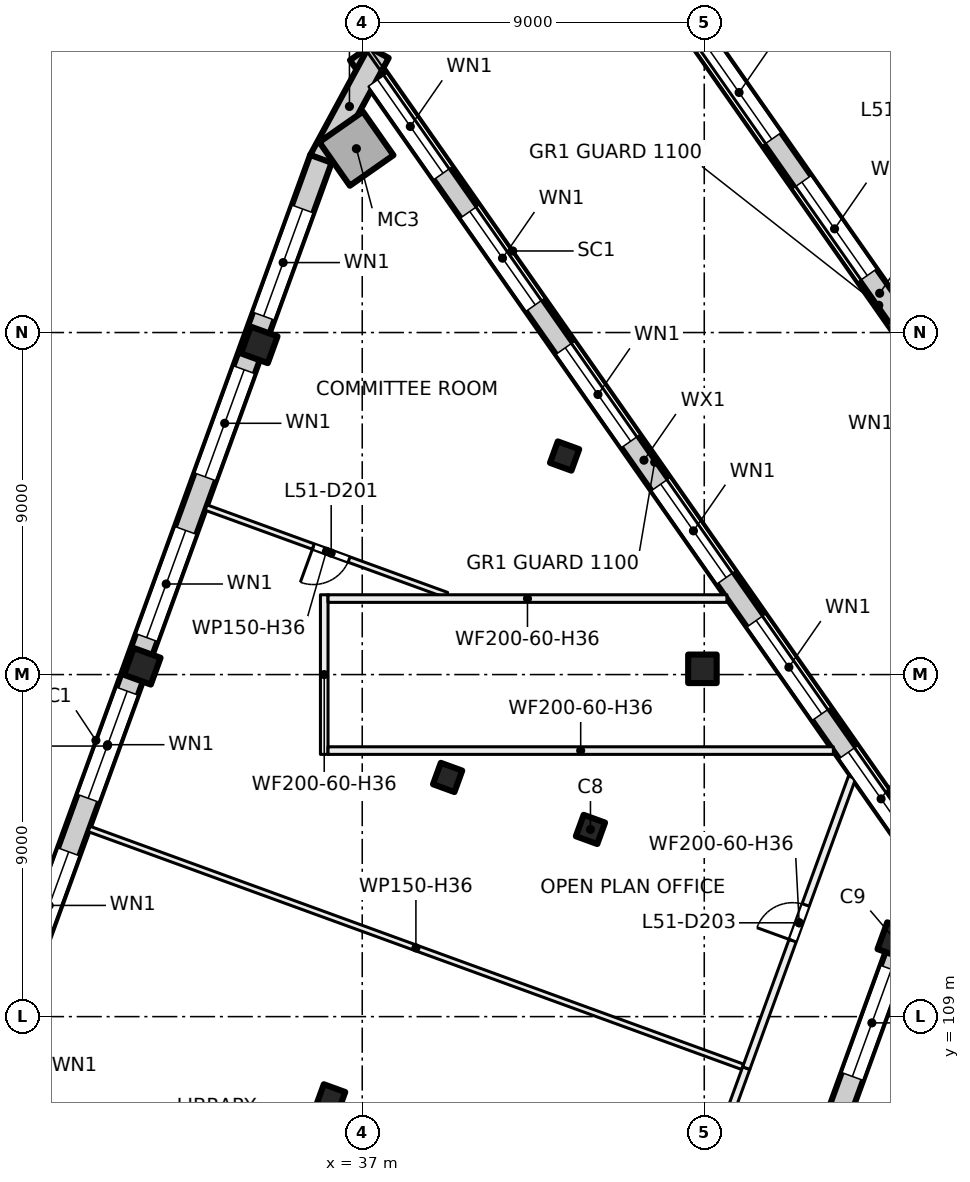
"""IFC4 building model, lengths in metres.
Left out: names, types, materials, properties, quantities, classifications, styles, units other than length and angle.
Written with IfcOpenShell. Run it as: python <this file> out.ifc"""

import sys

from ifc_helpers import new_model, si_unit, direction, frame, frame_2d, origin, origin_2d, place, context, subcontext, project, spatial, rectangle, hollow_rectangle, extrude, element, fill, save


model = new_model("IFC4")
c1 = context("Model", 3, precision=1e-05, world=origin(), true_north=direction((0.0, 1.0)))
c2 = subcontext(c1, "Body", "Model", "MODEL_VIEW")
j1 = project(units=[si_unit("LENGTHUNIT", "METRE"), si_unit("PLANEANGLEUNIT", "RADIAN")], contexts=[c1])
p1 = place(None, origin())
s1 = spatial("IfcSite", under=j1, at=p1, CompositionType="ELEMENT")
p2 = place(p1, origin())
s2 = spatial("IfcBuilding", under=s1, at=p2, CompositionType="ELEMENT")
p3 = place(p2, frame((0.0, 0.0, 216.0)))
s3 = spatial("IfcBuildingStorey", under=s2, at=p3, CompositionType="ELEMENT", Elevation=216.0)
p4 = place(p3, frame((36.846, 131.838, 0.0), z_axis=(0.0, 0.0, 1.0), x_axis=(0.573576436351, -0.819152044289, 0.0)))
e1 = element("IfcColumn", 1, at=p4, inside=s3, PredefinedType="COLUMN", context=c2, shape_type="SweptSolid", body=[
    extrude(hollow_rectangle(XDim=1.4, YDim=1.4, WallThickness=0.032, at=origin_2d()), origin(), (0.0, 0.0, 1.0), 4.0),
])
p5 = place(p3, frame((45.952, 118.152, 0.0), z_axis=(0.0, 0.0, 1.0), x_axis=(1.0, 0.0, 0.0)))
e2 = element("IfcColumn", 2, at=p5, inside=s3, PredefinedType="COLUMN", context=c2, shape_type="SweptSolid", body=[
    extrude(rectangle(XDim=0.75, YDim=0.75, at=origin_2d()), origin(), (0.0, 0.0, 1.0), 4.0),
])
for number, where, z_axis, x_axis in (
    (3, (43.006, 113.925, 0.0), (0.0, 0.0, 1.0), (-0.342, -0.94, 0.0)),
    (4, (42.325, 123.751, 0.0), (0.0, 0.0, 1.0), (-0.342, -0.94, 0.0)),
    (5, (39.247, 115.293, 0.0), (0.0, 0.0, 1.0), (-0.342, -0.94, 0.0)),
    (6, (36.169, 106.836, 0.0), (0.0, 0.0, 1.0), (-0.342, -0.94, 0.0)),
):
    element("IfcColumn", number, at=place(p3, frame(where, z_axis=z_axis, x_axis=x_axis)), inside=s3, PredefinedType="COLUMN", context=c2, shape_type="SweptSolid", body=[
        extrude(rectangle(XDim=0.6, YDim=0.6, at=origin_2d()), origin(), (0.0, 0.0, 1.0), 4.0),
    ])
for number, where, z_axis, x_axis in (
    (7, (51.04, 111.001, 0.0), (0.0, 0.0, 1.0), (-0.342, -0.94, 0.0)),
    (8, (34.291, 126.675, 0.0), (0.0, 0.0, 1.0), (-0.342, -0.94, 0.0)),
    (9, (31.212, 118.218, 0.0), (0.0, 0.0, 1.0), (-0.342, -0.94, 0.0)),
):
    element("IfcColumn", number, at=place(p3, frame(where, z_axis=z_axis, x_axis=x_axis)), inside=s3, PredefinedType="COLUMN", context=c2, shape_type="SweptSolid", body=[
        extrude(rectangle(XDim=0.75, YDim=0.75, at=origin_2d()), origin(), (0.0, 0.0, 1.0), 4.0),
    ])
p6 = place(p3, frame((58.083, 117.369, 0.0), z_axis=(0.0, 0.0, 1.0), x_axis=(-0.573573095716, 0.819154383416, 0.0)))
e10 = element("IfcWall", 10, at=p6, inside=s3, PredefinedType="SOLIDWALL", context=c2, shape_type="SweptSolid", body=[
    extrude(rectangle(XDim=26.037, YDim=0.6, at=frame_2d((13.019, 0.0))), origin(), (0.0, 0.0, 1.0), 3.625),
])
p7 = place(p6, frame((0.6, 0.0, 0.9)))
e11 = element("IfcOpeningElement", 11, at=p7, cuts=e10, PredefinedType="OPENING", context=c2, shape_type="SweptSolid", body=[
    extrude(rectangle(XDim=3.0, YDim=2.4, at=frame_2d((1.5, 1.2))), frame((0.0, 0.31, 0.0), z_axis=(0.0, -1.0, 0.0), x_axis=(1.0, 0.0, 0.0)), (0.0, 0.0, 1.0), 0.62),
])
p8 = place(p6, frame((4.829, 0.0, 0.9)))
e12 = element("IfcOpeningElement", 12, at=p8, cuts=e10, PredefinedType="OPENING", context=c2, shape_type="SweptSolid", body=[
    extrude(rectangle(XDim=3.0, YDim=2.4, at=frame_2d((1.5, 1.2))), frame((0.0, 0.31, 0.0), z_axis=(0.0, -1.0, 0.0), x_axis=(1.0, 0.0, 0.0)), (0.0, 0.0, 1.0), 0.62),
])
p9 = place(p6, frame((9.209, 0.0, 0.9)))
e13 = element("IfcOpeningElement", 13, at=p9, cuts=e10, PredefinedType="OPENING", context=c2, shape_type="SweptSolid", body=[
    extrude(rectangle(XDim=3.0, YDim=2.4, at=frame_2d((1.5, 1.2))), frame((0.0, 0.31, 0.0), z_axis=(0.0, -1.0, 0.0), x_axis=(1.0, 0.0, 0.0)), (0.0, 0.0, 1.0), 0.62),
])
p10 = place(p6, frame((13.588, 0.0, 0.9)))
e14 = element("IfcOpeningElement", 14, at=p10, cuts=e10, PredefinedType="OPENING", context=c2, shape_type="SweptSolid", body=[
    extrude(rectangle(XDim=3.0, YDim=2.4, at=frame_2d((1.5, 1.2))), frame((0.0, 0.31, 0.0), z_axis=(0.0, -1.0, 0.0), x_axis=(1.0, 0.0, 0.0)), (0.0, 0.0, 1.0), 0.62),
])
p11 = place(p6, frame((17.968, 0.0, 0.9)))
e15 = element("IfcOpeningElement", 15, at=p11, cuts=e10, PredefinedType="OPENING", context=c2, shape_type="SweptSolid", body=[
    extrude(rectangle(XDim=3.0, YDim=2.4, at=frame_2d((1.5, 1.2))), frame((0.0, 0.31, 0.0), z_axis=(0.0, -1.0, 0.0), x_axis=(1.0, 0.0, 0.0)), (0.0, 0.0, 1.0), 0.62),
])
p12 = place(p6, frame((22.198, 0.0, 0.9)))
e16 = element("IfcOpeningElement", 16, at=p12, cuts=e10, PredefinedType="OPENING", context=c2, shape_type="SweptSolid", body=[
    extrude(rectangle(XDim=3.0, YDim=2.4, at=frame_2d((1.5, 1.2))), frame((0.0, 0.31, 0.0), z_axis=(0.0, -1.0, 0.0), x_axis=(1.0, 0.0, 0.0)), (0.0, 0.0, 1.0), 0.62),
])
p13 = place(p3, frame((51.877, 112.862, 0.0), z_axis=(0.0, 0.0, 1.0), x_axis=(-0.342020589714, -0.939692458314, 0.0)))
e17 = element("IfcWall", 17, at=p13, inside=s3, PredefinedType="SOLIDWALL", context=c2, shape_type="SweptSolid", body=[
    extrude(rectangle(XDim=20.765, YDim=0.6, at=frame_2d((10.382, 0.0))), origin(), (0.0, 0.0, 1.0), 3.625),
])
p14 = place(p13, frame((2.785, 0.0, 0.9)))
e18 = element("IfcOpeningElement", 18, at=p14, cuts=e17, PredefinedType="OPENING", context=c2, shape_type="SweptSolid", body=[
    extrude(rectangle(XDim=3.0, YDim=2.4, at=frame_2d((1.5, 1.2))), frame((0.0, 0.31, 0.0), z_axis=(0.0, -1.0, 0.0), x_axis=(1.0, 0.0, 0.0)), (0.0, 0.0, 1.0), 0.62),
])
p15 = place(p13, frame((7.285, 0.0, 0.9)))
e19 = element("IfcOpeningElement", 19, at=p15, cuts=e17, PredefinedType="OPENING", context=c2, shape_type="SweptSolid", body=[
    extrude(rectangle(XDim=3.0, YDim=2.4, at=frame_2d((1.5, 1.2))), frame((0.0, 0.31, 0.0), z_axis=(0.0, -1.0, 0.0), x_axis=(1.0, 0.0, 0.0)), (0.0, 0.0, 1.0), 0.62),
])
p16 = place(p13, frame((11.785, 0.0, 0.9)))
e20 = element("IfcOpeningElement", 20, at=p16, cuts=e17, PredefinedType="OPENING", context=c2, shape_type="SweptSolid", body=[
    extrude(rectangle(XDim=3.0, YDim=2.4, at=frame_2d((1.5, 1.2))), frame((0.0, 0.31, 0.0), z_axis=(0.0, -1.0, 0.0), x_axis=(1.0, 0.0, 0.0)), (0.0, 0.0, 1.0), 0.62),
])
p17 = place(p13, frame((16.285, 0.0, 0.9)))
e21 = element("IfcOpeningElement", 21, at=p17, cuts=e17, PredefinedType="OPENING", context=c2, shape_type="SweptSolid", body=[
    extrude(rectangle(XDim=3.0, YDim=2.4, at=frame_2d((1.5, 1.2))), frame((0.0, 0.31, 0.0), z_axis=(0.0, -1.0, 0.0), x_axis=(1.0, 0.0, 0.0)), (0.0, 0.0, 1.0), 0.62),
])
p18 = place(p3, frame((36.923, 134.338, 0.0), z_axis=(0.0, 0.0, 1.0), x_axis=(0.573575266068, -0.819152863729, 0.0)))
e22 = element("IfcWall", 22, at=p18, inside=s3, PredefinedType="SOLIDWALL", context=c2, shape_type="SweptSolid", body=[
    extrude(rectangle(XDim=26.117, YDim=0.6, at=frame_2d((13.059, 0.0))), origin(), (0.0, 0.0, 1.0), 3.625),
])
p19 = place(p18, frame((0.84, 0.0, 0.9)))
e23 = element("IfcOpeningElement", 23, at=p19, cuts=e22, PredefinedType="OPENING", context=c2, shape_type="SweptSolid", body=[
    extrude(rectangle(XDim=3.0, YDim=2.4, at=frame_2d((1.5, 1.2))), frame((0.0, 0.31, 0.0), z_axis=(0.0, -1.0, 0.0), x_axis=(1.0, 0.0, 0.0)), (0.0, 0.0, 1.0), 0.62),
])
p20 = place(p18, frame((5.069, 0.0, 0.9)))
e24 = element("IfcOpeningElement", 24, at=p20, cuts=e22, PredefinedType="OPENING", context=c2, shape_type="SweptSolid", body=[
    extrude(rectangle(XDim=3.0, YDim=2.4, at=frame_2d((1.5, 1.2))), frame((0.0, 0.31, 0.0), z_axis=(0.0, -1.0, 0.0), x_axis=(1.0, 0.0, 0.0)), (0.0, 0.0, 1.0), 0.62),
])
p21 = place(p18, frame((9.449, 0.0, 0.9)))
e25 = element("IfcOpeningElement", 25, at=p21, cuts=e22, PredefinedType="OPENING", context=c2, shape_type="SweptSolid", body=[
    extrude(rectangle(XDim=3.0, YDim=2.4, at=frame_2d((1.5, 1.2))), frame((0.0, 0.31, 0.0), z_axis=(0.0, -1.0, 0.0), x_axis=(1.0, 0.0, 0.0)), (0.0, 0.0, 1.0), 0.62),
])
p22 = place(p18, frame((13.829, 0.0, 0.9)))
e26 = element("IfcOpeningElement", 26, at=p22, cuts=e22, PredefinedType="OPENING", context=c2, shape_type="SweptSolid", body=[
    extrude(rectangle(XDim=3.0, YDim=2.4, at=frame_2d((1.5, 1.2))), frame((0.0, 0.31, 0.0), z_axis=(0.0, -1.0, 0.0), x_axis=(1.0, 0.0, 0.0)), (0.0, 0.0, 1.0), 0.62),
])
p23 = place(p18, frame((18.208, 0.0, 0.9)))
e27 = element("IfcOpeningElement", 27, at=p23, cuts=e22, PredefinedType="OPENING", context=c2, shape_type="SweptSolid", body=[
    extrude(rectangle(XDim=3.0, YDim=2.4, at=frame_2d((1.5, 1.2))), frame((0.0, 0.31, 0.0), z_axis=(0.0, -1.0, 0.0), x_axis=(1.0, 0.0, 0.0)), (0.0, 0.0, 1.0), 0.62),
])
p24 = place(p18, frame((22.438, 0.0, 0.9)))
e28 = element("IfcOpeningElement", 28, at=p24, cuts=e22, PredefinedType="OPENING", context=c2, shape_type="SweptSolid", body=[
    extrude(rectangle(XDim=3.0, YDim=2.4, at=frame_2d((1.5, 1.2))), frame((0.0, 0.31, 0.0), z_axis=(0.0, -1.0, 0.0), x_axis=(1.0, 0.0, 0.0)), (0.0, 0.0, 1.0), 0.62),
])
p25 = place(p3, frame((35.895, 131.53, 0.0), z_axis=(0.0, 0.0, 1.0), x_axis=(0.476529237666, 0.879158623713, 0.0)))
e29 = element("IfcWall", 29, at=p25, inside=s3, PredefinedType="SOLIDWALL", context=c2, shape_type="SweptSolid", body=[
    extrude(rectangle(XDim=3.228, YDim=0.6, at=frame_2d((1.614, 0.0))), origin(), (0.0, 0.0, 1.0), 3.625),
])
p26 = place(p3, frame((24.666, 100.669, 0.0), z_axis=(0.0, 0.0, 1.0), x_axis=(0.34201964167, 0.939692803373, 0.0)))
e30 = element("IfcWall", 30, at=p26, inside=s3, PredefinedType="SOLIDWALL", context=c2, shape_type="SweptSolid", body=[
    extrude(rectangle(XDim=32.884, YDim=0.6, at=frame_2d((16.442, 0.0))), origin(), (0.0, 0.0, 1.0), 3.625),
])
p27 = place(p26, frame((1.48, 0.0, 0.9)))
e31 = element("IfcOpeningElement", 31, at=p27, cuts=e30, PredefinedType="OPENING", context=c2, shape_type="SweptSolid", body=[
    extrude(rectangle(XDim=3.0, YDim=2.4, at=frame_2d((1.5, 1.2))), frame((0.0, 0.31, 0.0), z_axis=(0.0, -1.0, 0.0), x_axis=(1.0, 0.0, 0.0)), (0.0, 0.0, 1.0), 0.62),
])
p28 = place(p26, frame((5.98, 0.0, 0.9)))
e32 = element("IfcOpeningElement", 32, at=p28, cuts=e30, PredefinedType="OPENING", context=c2, shape_type="SweptSolid", body=[
    extrude(rectangle(XDim=3.0, YDim=2.4, at=frame_2d((1.5, 1.2))), frame((0.0, 0.31, 0.0), z_axis=(0.0, -1.0, 0.0), x_axis=(1.0, 0.0, 0.0)), (0.0, 0.0, 1.0), 0.62),
])
p29 = place(p26, frame((10.48, 0.0, 0.9)))
e33 = element("IfcOpeningElement", 33, at=p29, cuts=e30, PredefinedType="OPENING", context=c2, shape_type="SweptSolid", body=[
    extrude(rectangle(XDim=3.0, YDim=2.4, at=frame_2d((1.5, 1.2))), frame((0.0, 0.31, 0.0), z_axis=(0.0, -1.0, 0.0), x_axis=(1.0, 0.0, 0.0)), (0.0, 0.0, 1.0), 0.62),
])
p30 = place(p26, frame((14.98, 0.0, 0.9)))
e34 = element("IfcOpeningElement", 34, at=p30, cuts=e30, PredefinedType="OPENING", context=c2, shape_type="SweptSolid", body=[
    extrude(rectangle(XDim=3.0, YDim=2.4, at=frame_2d((1.5, 1.2))), frame((0.0, 0.31, 0.0), z_axis=(0.0, -1.0, 0.0), x_axis=(1.0, 0.0, 0.0)), (0.0, 0.0, 1.0), 0.62),
])
p31 = place(p26, frame((19.48, 0.0, 0.9)))
e35 = element("IfcOpeningElement", 35, at=p31, cuts=e30, PredefinedType="OPENING", context=c2, shape_type="SweptSolid", body=[
    extrude(rectangle(XDim=3.0, YDim=2.4, at=frame_2d((1.5, 1.2))), frame((0.0, 0.31, 0.0), z_axis=(0.0, -1.0, 0.0), x_axis=(1.0, 0.0, 0.0)), (0.0, 0.0, 1.0), 0.62),
])
p32 = place(p26, frame((23.98, 0.0, 0.9)))
e36 = element("IfcOpeningElement", 36, at=p32, cuts=e30, PredefinedType="OPENING", context=c2, shape_type="SweptSolid", body=[
    extrude(rectangle(XDim=3.0, YDim=2.4, at=frame_2d((1.5, 1.2))), frame((0.0, 0.31, 0.0), z_axis=(0.0, -1.0, 0.0), x_axis=(1.0, 0.0, 0.0)), (0.0, 0.0, 1.0), 0.62),
])
p33 = place(p26, frame((28.48, 0.0, 0.9)))
e37 = element("IfcOpeningElement", 37, at=p33, cuts=e30, PredefinedType="OPENING", context=c2, shape_type="SweptSolid", body=[
    extrude(rectangle(XDim=3.0, YDim=2.4, at=frame_2d((1.5, 1.2))), frame((0.0, 0.31, 0.0), z_axis=(0.0, -1.0, 0.0), x_axis=(1.0, 0.0, 0.0)), (0.0, 0.0, 1.0), 0.62),
])
p34 = place(p3, frame((29.814, 113.938, 0.0), z_axis=(0.0, 0.0, 1.0), x_axis=(0.939695619185, -0.342011905181, 0.0)))
e38 = element("IfcWall", 38, at=p34, inside=s3, PredefinedType="PARTITIONING", context=c2, shape_type="SweptSolid", body=[
    extrude(rectangle(XDim=18.301, YDim=0.15, at=frame_2d((9.15, 0.0))), origin(), (0.0, 0.0, 1.0), 3.625),
])
p35 = place(p3, frame((39.223, 120.091, 0.0), z_axis=(0.0, 0.0, 1.0), x_axis=(-0.939705573142, 0.341984554924, 0.0)))
e39 = element("IfcWall", 39, at=p35, inside=s3, PredefinedType="PARTITIONING", context=c2, shape_type="SweptSolid", body=[
    extrude(rectangle(XDim=6.737, YDim=0.15, at=frame_2d((3.369, 0.0))), origin(), (0.0, 0.0, 1.0), 3.625),
])
p36 = place(p35, frame((2.735, 0.0, 0.0)))
e40 = element("IfcOpeningElement", 40, at=p36, cuts=e39, PredefinedType="OPENING", context=c2, shape_type="SweptSolid", body=[
    extrude(rectangle(XDim=1.0, YDim=2.1, at=frame_2d((0.5, 1.05))), frame((0.0, 0.085, 0.0), z_axis=(0.0, -1.0, 0.0), x_axis=(1.0, 0.0, 0.0)), (0.0, 0.0, 1.0), 0.17),
])
p37 = place(p3, frame((36.0, 115.9, 0.0), z_axis=(0.0, 0.0, 1.0), x_axis=(0.0, 1.0, 0.0)))
e41 = element("IfcWall", 41, at=p37, inside=s3, PredefinedType="PARTITIONING", context=c2, shape_type="SweptSolid", body=[
    extrude(rectangle(XDim=4.2, YDim=0.2, at=frame_2d((2.1, 0.0))), origin(), (0.0, 0.0, 1.0), 3.625),
])
p38 = place(p3, frame((36.1, 116.0, 0.0), z_axis=(0.0, 0.0, 1.0), x_axis=(1.0, 0.0, 0.0)))
e42 = element("IfcWall", 42, at=p38, inside=s3, PredefinedType="PARTITIONING", context=c2, shape_type="SweptSolid", body=[
    extrude(rectangle(XDim=13.297, YDim=0.2, at=frame_2d((6.648, 0.0))), origin(), (0.0, 0.0, 1.0), 3.625),
])
p39 = place(p3, frame((36.1, 120.0, 0.0), z_axis=(0.0, 0.0, 1.0), x_axis=(1.0, 0.0, 0.0)))
e43 = element("IfcWall", 43, at=p39, inside=s3, PredefinedType="PARTITIONING", context=c2, shape_type="SweptSolid", body=[
    extrude(rectangle(XDim=10.496, YDim=0.2, at=frame_2d((5.248, 0.0))), origin(), (0.0, 0.0, 1.0), 3.625),
])
p40 = place(p3, frame((43.428, 97.543, 0.0), z_axis=(0.0, 0.0, 1.0), x_axis=(0.342032970316, 0.939687952044, 0.0)))
e44 = element("IfcWall", 44, at=p40, inside=s3, PredefinedType="PARTITIONING", context=c2, shape_type="SweptSolid", body=[
    extrude(rectangle(XDim=10.75, YDim=0.2, at=frame_2d((5.375, 0.0))), origin(), (0.0, 0.0, 1.0), 3.625),
])
p41 = place(p40, frame((4.827, 0.0, 0.0)))
e45 = element("IfcOpeningElement", 45, at=p41, cuts=e44, PredefinedType="OPENING", context=c2, shape_type="SweptSolid", body=[
    extrude(rectangle(XDim=1.0, YDim=2.1, at=frame_2d((0.5, 1.05))), frame((0.0, 0.11, 0.0), z_axis=(0.0, -1.0, 0.0), x_axis=(1.0, 0.0, 0.0)), (0.0, 0.0, 1.0), 0.22),
])
p42 = place(p3, frame((47.105, 107.645, 0.0), z_axis=(0.0, 0.0, 1.0), x_axis=(0.342043994394, 0.939683939364, 0.0)))
e46 = element("IfcWall", 46, at=p42, inside=s3, PredefinedType="PARTITIONING", context=c2, shape_type="SweptSolid", body=[
    extrude(rectangle(XDim=8.142, YDim=0.2, at=frame_2d((4.071, 0.0))), origin(), (0.0, 0.0, 1.0), 3.625),
])
p43 = place(p42, frame((3.569, 0.0, 0.0)))
e47 = element("IfcOpeningElement", 47, at=p43, cuts=e46, PredefinedType="OPENING", context=c2, shape_type="SweptSolid", body=[
    extrude(rectangle(XDim=1.0, YDim=2.1, at=frame_2d((0.5, 1.05))), frame((0.0, 0.11, 0.0), z_axis=(0.0, -1.0, 0.0), x_axis=(1.0, 0.0, 0.0)), (0.0, 0.0, 1.0), 0.22),
])
p44 = place(p10, origin())
e48 = element("IfcWindow", 48, at=p44, inside=s3, PartitioningType="SINGLE_PANEL", PredefinedType="WINDOW", context=c2, shape_type="SweptSolid", body=[
    extrude(rectangle(XDim=3.0, YDim=2.4, at=frame_2d((1.5, 1.2))), frame((0.0, 0.03, 0.0), z_axis=(0.0, -1.0, 0.0), x_axis=(1.0, 0.0, 0.0)), (0.0, 0.0, 1.0), 0.06),
])
fill(e14, e48)
p45 = place(p11, origin())
e49 = element("IfcWindow", 49, at=p45, inside=s3, PartitioningType="SINGLE_PANEL", PredefinedType="WINDOW", context=c2, shape_type="SweptSolid", body=[
    extrude(rectangle(XDim=3.0, YDim=2.4, at=frame_2d((1.5, 1.2))), frame((0.0, 0.03, 0.0), z_axis=(0.0, -1.0, 0.0), x_axis=(1.0, 0.0, 0.0)), (0.0, 0.0, 1.0), 0.06),
])
fill(e15, e49)
p46 = place(p14, origin())
e50 = element("IfcWindow", 50, at=p46, inside=s3, PartitioningType="SINGLE_PANEL", PredefinedType="WINDOW", context=c2, shape_type="SweptSolid", body=[
    extrude(rectangle(XDim=3.0, YDim=2.4, at=frame_2d((1.5, 1.2))), frame((0.0, 0.03, 0.0), z_axis=(0.0, -1.0, 0.0), x_axis=(1.0, 0.0, 0.0)), (0.0, 0.0, 1.0), 0.06),
])
fill(e18, e50)
p47 = place(p19, origin())
e51 = element("IfcWindow", 51, at=p47, inside=s3, PartitioningType="SINGLE_PANEL", PredefinedType="WINDOW", context=c2, shape_type="SweptSolid", body=[
    extrude(rectangle(XDim=3.0, YDim=2.4, at=frame_2d((1.5, 1.2))), frame((0.0, 0.03, 0.0), z_axis=(0.0, -1.0, 0.0), x_axis=(1.0, 0.0, 0.0)), (0.0, 0.0, 1.0), 0.06),
])
fill(e23, e51)
p48 = place(p20, origin())
e52 = element("IfcWindow", 52, at=p48, inside=s3, PartitioningType="SINGLE_PANEL", PredefinedType="WINDOW", context=c2, shape_type="SweptSolid", body=[
    extrude(rectangle(XDim=3.0, YDim=2.4, at=frame_2d((1.5, 1.2))), frame((0.0, 0.03, 0.0), z_axis=(0.0, -1.0, 0.0), x_axis=(1.0, 0.0, 0.0)), (0.0, 0.0, 1.0), 0.06),
])
fill(e24, e52)
p49 = place(p21, origin())
e53 = element("IfcWindow", 53, at=p49, inside=s3, PartitioningType="SINGLE_PANEL", PredefinedType="WINDOW", context=c2, shape_type="SweptSolid", body=[
    extrude(rectangle(XDim=3.0, YDim=2.4, at=frame_2d((1.5, 1.2))), frame((0.0, 0.03, 0.0), z_axis=(0.0, -1.0, 0.0), x_axis=(1.0, 0.0, 0.0)), (0.0, 0.0, 1.0), 0.06),
])
fill(e25, e53)
p50 = place(p22, origin())
e54 = element("IfcWindow", 54, at=p50, inside=s3, PartitioningType="SINGLE_PANEL", PredefinedType="WINDOW", context=c2, shape_type="SweptSolid", body=[
    extrude(rectangle(XDim=3.0, YDim=2.4, at=frame_2d((1.5, 1.2))), frame((0.0, 0.03, 0.0), z_axis=(0.0, -1.0, 0.0), x_axis=(1.0, 0.0, 0.0)), (0.0, 0.0, 1.0), 0.06),
])
fill(e26, e54)
p51 = place(p23, origin())
e55 = element("IfcWindow", 55, at=p51, inside=s3, PartitioningType="SINGLE_PANEL", PredefinedType="WINDOW", context=c2, shape_type="SweptSolid", body=[
    extrude(rectangle(XDim=3.0, YDim=2.4, at=frame_2d((1.5, 1.2))), frame((0.0, 0.03, 0.0), z_axis=(0.0, -1.0, 0.0), x_axis=(1.0, 0.0, 0.0)), (0.0, 0.0, 1.0), 0.06),
])
fill(e27, e55)
p52 = place(p24, origin())
e56 = element("IfcWindow", 56, at=p52, inside=s3, PartitioningType="SINGLE_PANEL", PredefinedType="WINDOW", context=c2, shape_type="SweptSolid", body=[
    extrude(rectangle(XDim=3.0, YDim=2.4, at=frame_2d((1.5, 1.2))), frame((0.0, 0.03, 0.0), z_axis=(0.0, -1.0, 0.0), x_axis=(1.0, 0.0, 0.0)), (0.0, 0.0, 1.0), 0.06),
])
fill(e28, e56)
p53 = place(p29, origin())
e57 = element("IfcWindow", 57, at=p53, inside=s3, PartitioningType="SINGLE_PANEL", PredefinedType="WINDOW", context=c2, shape_type="SweptSolid", body=[
    extrude(rectangle(XDim=3.0, YDim=2.4, at=frame_2d((1.5, 1.2))), frame((0.0, 0.03, 0.0), z_axis=(0.0, -1.0, 0.0), x_axis=(1.0, 0.0, 0.0)), (0.0, 0.0, 1.0), 0.06),
])
fill(e33, e57)
p54 = place(p30, origin())
e58 = element("IfcWindow", 58, at=p54, inside=s3, PartitioningType="SINGLE_PANEL", PredefinedType="WINDOW", context=c2, shape_type="SweptSolid", body=[
    extrude(rectangle(XDim=3.0, YDim=2.4, at=frame_2d((1.5, 1.2))), frame((0.0, 0.03, 0.0), z_axis=(0.0, -1.0, 0.0), x_axis=(1.0, 0.0, 0.0)), (0.0, 0.0, 1.0), 0.06),
])
fill(e34, e58)
p55 = place(p31, origin())
e59 = element("IfcWindow", 59, at=p55, inside=s3, PartitioningType="SINGLE_PANEL", PredefinedType="WINDOW", context=c2, shape_type="SweptSolid", body=[
    extrude(rectangle(XDim=3.0, YDim=2.4, at=frame_2d((1.5, 1.2))), frame((0.0, 0.03, 0.0), z_axis=(0.0, -1.0, 0.0), x_axis=(1.0, 0.0, 0.0)), (0.0, 0.0, 1.0), 0.06),
])
fill(e35, e59)
p56 = place(p32, origin())
e60 = element("IfcWindow", 60, at=p56, inside=s3, PartitioningType="SINGLE_PANEL", PredefinedType="WINDOW", context=c2, shape_type="SweptSolid", body=[
    extrude(rectangle(XDim=3.0, YDim=2.4, at=frame_2d((1.5, 1.2))), frame((0.0, 0.03, 0.0), z_axis=(0.0, -1.0, 0.0), x_axis=(1.0, 0.0, 0.0)), (0.0, 0.0, 1.0), 0.06),
])
fill(e36, e60)
p57 = place(p33, origin())
e61 = element("IfcWindow", 61, at=p57, inside=s3, PartitioningType="SINGLE_PANEL", PredefinedType="WINDOW", context=c2, shape_type="SweptSolid", body=[
    extrude(rectangle(XDim=3.0, YDim=2.4, at=frame_2d((1.5, 1.2))), frame((0.0, 0.03, 0.0), z_axis=(0.0, -1.0, 0.0), x_axis=(1.0, 0.0, 0.0)), (0.0, 0.0, 1.0), 0.06),
])
fill(e37, e61)
p58 = place(p36, origin())
e62 = element("IfcDoor", 62, at=p58, inside=s3, OperationType="SINGLE_SWING_RIGHT", PredefinedType="DOOR", context=c2, shape_type="SweptSolid", body=[
    extrude(rectangle(XDim=1.0, YDim=2.1, at=frame_2d((0.5, 1.05))), frame((0.0, 0.025, 0.0), z_axis=(0.0, -1.0, 0.0), x_axis=(1.0, 0.0, 0.0)), (0.0, 0.0, 1.0), 0.05),
])
fill(e40, e62)
p59 = place(p43, origin())
e63 = element("IfcDoor", 63, at=p59, inside=s3, OperationType="SINGLE_SWING_LEFT", PredefinedType="DOOR", context=c2, shape_type="SweptSolid", body=[
    extrude(rectangle(XDim=1.0, YDim=2.1, at=frame_2d((0.5, 1.05))), frame((0.0, 0.025, 0.0), z_axis=(0.0, -1.0, 0.0), x_axis=(1.0, 0.0, 0.0)), (0.0, 0.0, 1.0), 0.05),
])
fill(e47, e63)
save(model, sys.argv[1])
